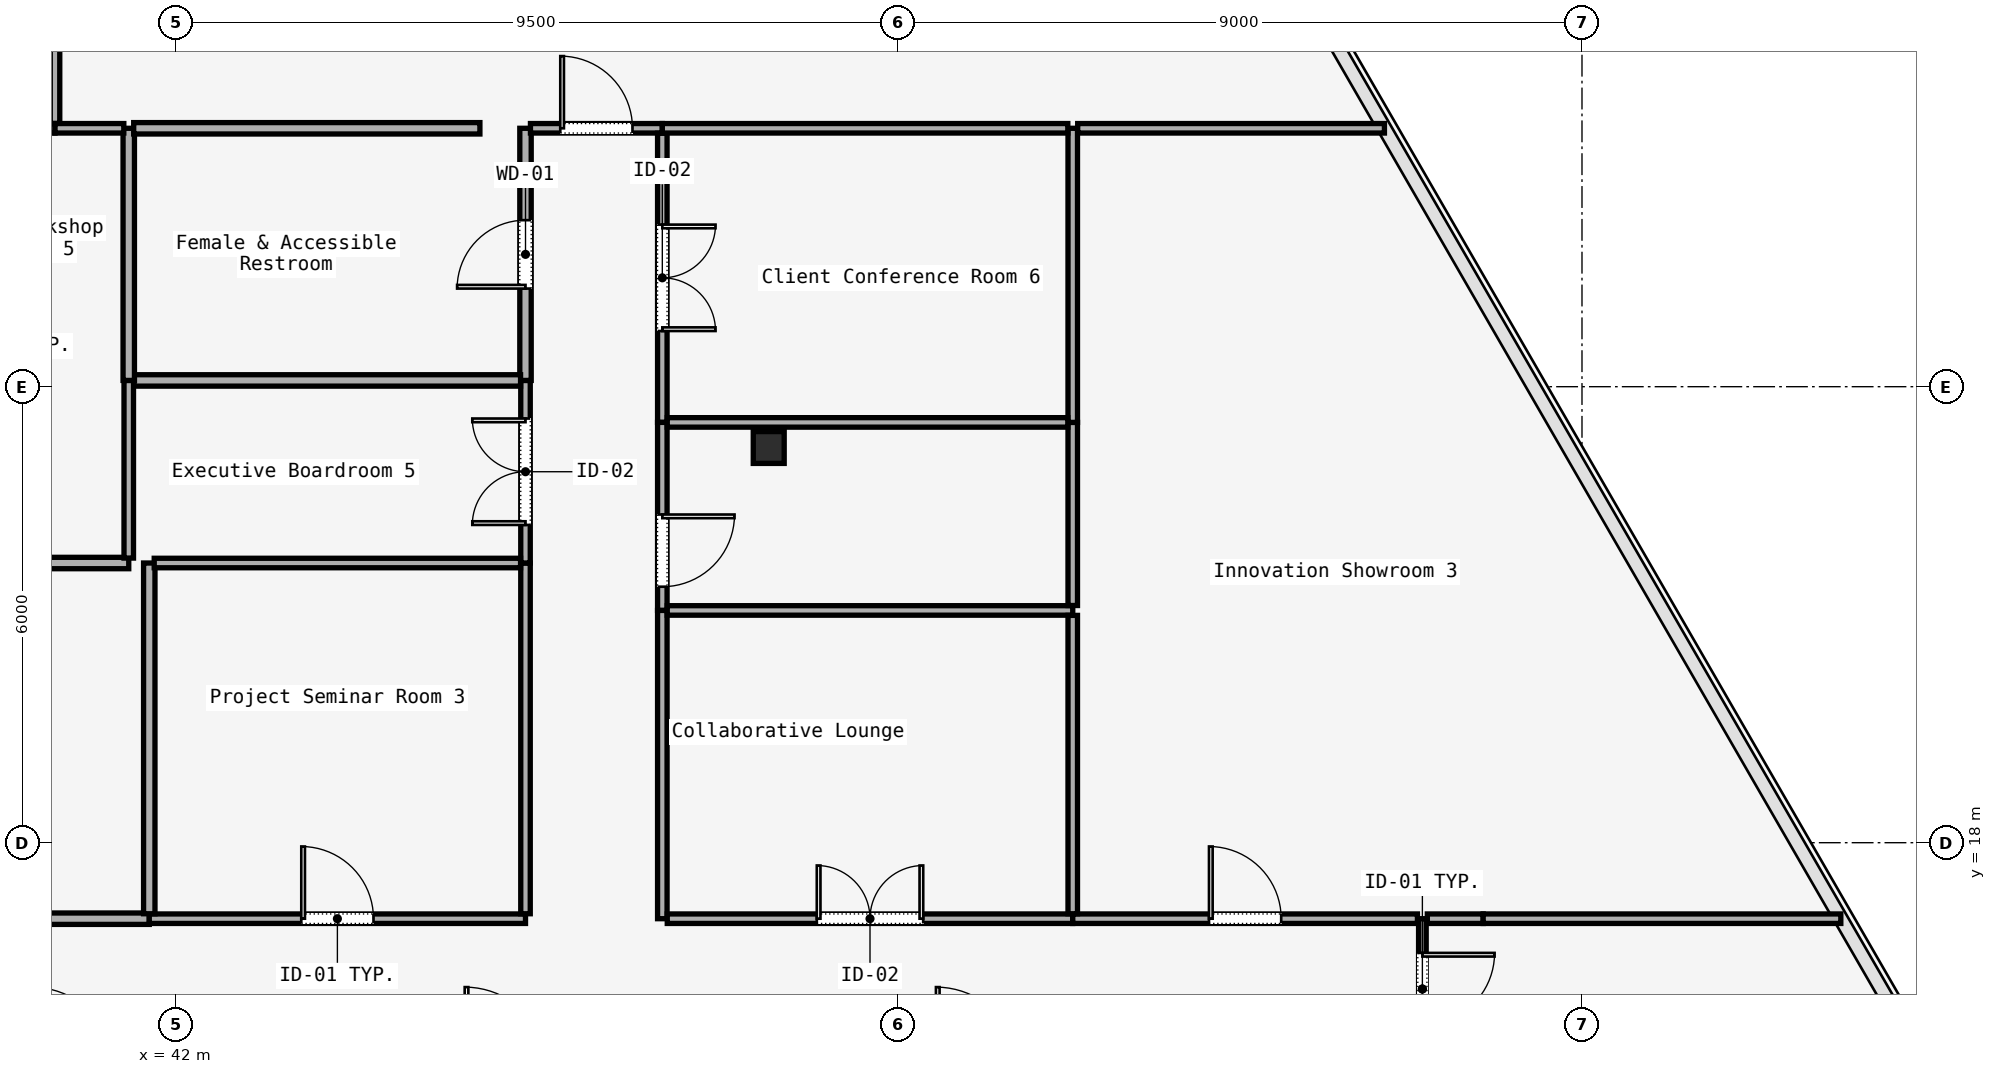
"""IFC4 building model, lengths in metres.
Left out: names, types, materials, properties, quantities, classifications, styles, units other than length and angle.
Written with IfcOpenShell. Run it as: python <this file> out.ifc"""

import sys

from ifc_helpers import new_model, si_unit, direction, frame, frame_2d, origin, origin_2d, place, context, subcontext, project, spatial, rectangle, i_section, extrude, element, fill, save


model = new_model("IFC4")
c1 = context("Model", 3, precision=1e-05, world=origin(), true_north=direction((0.0, 1.0)))
c2 = subcontext(c1, "Body", "Model", "MODEL_VIEW")
j1 = project(units=[si_unit("LENGTHUNIT", "METRE"), si_unit("PLANEANGLEUNIT", "RADIAN")], contexts=[c1])
p1 = place(None, origin())
s1 = spatial("IfcSite", under=j1, at=p1, CompositionType="ELEMENT")
p2 = place(p1, origin())
s2 = spatial("IfcBuilding", under=s1, at=p2, CompositionType="ELEMENT")
p3 = place(p2, frame((0.0, 0.0, 172.6)))
s3 = spatial("IfcBuildingStorey", under=s2, at=p3, CompositionType="ELEMENT", Elevation=172.6)
p4 = place(p3, frame((49.8, 23.2, 0.0), z_axis=(0.0, 0.0, 1.0), x_axis=(1.0, 0.0, 0.0)))
e1 = element("IfcColumn", 1, at=p4, inside=s3, PredefinedType="COLUMN", context=c2, shape_type="SweptSolid", body=[
    extrude(i_section(OverallWidth=0.407, OverallDepth=0.419, WebThickness=0.031, FlangeThickness=0.049, FilletRadius=0.015, at=origin_2d()), origin(), (0.0, 0.0, 1.0), 3.58),
])
p5 = place(p3, frame((58.4, 17.0, 0.0), z_axis=(0.0, 0.0, 1.0), x_axis=(0.0, -1.0, 0.0)))
e2 = element("IfcWall", 2, at=p5, inside=s3, PredefinedType="MOVABLE", context=c2, shape_type="SweptSolid", body=[
    extrude(rectangle(XDim=1.85, YDim=0.1, at=frame_2d((0.925, 0.0))), origin(), (0.0, 0.0, 1.0), 3.01),
])
p6 = place(p5, frame((0.45, 0.0, 0.0)))
e3 = element("IfcOpeningElement", 3, at=p6, cuts=e2, PredefinedType="OPENING", context=c2, shape_type="SweptSolid", body=[
    extrude(rectangle(XDim=0.95, YDim=2.2, at=frame_2d((0.475, 1.1))), frame((0.0, 0.05, 0.0), z_axis=(0.0, -1.0, 0.0), x_axis=(1.0, 0.0, 0.0)), (0.0, 0.0, 1.0), 0.1),
])
p7 = place(p3, frame((37.665, 17.0, 0.0), z_axis=(0.0, 0.0, 1.0), x_axis=(1.0, 0.0, 0.0)))
e4 = element("IfcWall", 4, at=p7, inside=s3, PredefinedType="PARTITIONING", context=c2, shape_type="SweptSolid", body=[
    extrude(rectangle(XDim=3.985, YDim=0.15, at=frame_2d((1.992, 0.0))), origin(), (0.0, 0.0, 1.0), 3.01),
])
p8 = place(p3, frame((41.65, 17.0, 0.0), z_axis=(0.0, 0.0, 1.0), x_axis=(1.0, 0.0, 0.0)))
e5 = element("IfcWall", 5, at=p8, inside=s3, PredefinedType="PARTITIONING", context=c2, shape_type="SweptSolid", body=[
    extrude(rectangle(XDim=4.95, YDim=0.125, at=frame_2d((2.475, 0.0))), origin(), (0.0, 0.0, 1.0), 3.01),
])
p9 = place(p8, frame((2.0, 0.0, 0.0)))
e6 = element("IfcOpeningElement", 6, at=p9, cuts=e5, PredefinedType="OPENING", context=c2, shape_type="SweptSolid", body=[
    extrude(rectangle(XDim=0.95, YDim=2.2, at=frame_2d((0.475, 1.1))), frame((0.0, 0.062, 0.0), z_axis=(0.0, -1.0, 0.0), x_axis=(1.0, 0.0, 0.0)), (0.0, 0.0, 1.0), 0.125),
])
p10 = place(p3, frame((46.6, 17.065, 0.0), z_axis=(0.0, 0.0, 1.0), x_axis=(0.0, 1.0, 0.0)))
e7 = element("IfcWall", 7, at=p10, inside=s3, PredefinedType="PARTITIONING", context=c2, shape_type="SweptSolid", body=[
    extrude(rectangle(XDim=4.615, YDim=0.125, at=frame_2d((2.308, 0.0))), origin(), (0.0, 0.0, 1.0), 3.01),
])
p11 = place(p3, frame((46.6, 21.68, 0.0), z_axis=(0.0, 0.0, 1.0), x_axis=(0.0, 1.0, 0.0)))
e8 = element("IfcWall", 8, at=p11, inside=s3, PredefinedType="PARTITIONING", context=c2, shape_type="SweptSolid", body=[
    extrude(rectangle(XDim=2.403, YDim=0.125, at=frame_2d((1.201, 0.0))), origin(), (0.0, 0.0, 1.0), 3.01),
])
p12 = place(p11, frame((0.501, 0.0, 0.0)))
e9 = element("IfcOpeningElement", 9, at=p12, cuts=e8, PredefinedType="OPENING", context=c2, shape_type="SweptSolid", body=[
    extrude(rectangle(XDim=1.4, YDim=2.2, at=frame_2d((0.7, 1.1))), frame((0.0, 0.062, 0.0), z_axis=(0.0, -1.0, 0.0), x_axis=(1.0, 0.0, 0.0)), (0.0, 0.0, 1.0), 0.125),
])
p13 = place(p3, frame((46.6, 24.083, 0.0), z_axis=(0.0, 0.0, 1.0), x_axis=(0.0, 1.0, 0.0)))
e10 = element("IfcWall", 10, at=p13, inside=s3, PredefinedType="PARTITIONING", context=c2, shape_type="SweptSolid", body=[
    extrude(rectangle(XDim=3.317, YDim=0.15, at=frame_2d((1.659, 0.0))), origin(), (0.0, 0.0, 1.0), 3.01),
])
p14 = place(p13, frame((1.209, 0.0, 0.0)))
e11 = element("IfcOpeningElement", 11, at=p14, cuts=e10, PredefinedType="OPENING", context=c2, shape_type="SweptSolid", body=[
    extrude(rectangle(XDim=0.9, YDim=2.15, at=frame_2d((0.45, 1.075))), frame((0.0, 0.075, 0.0), z_axis=(0.0, -1.0, 0.0), x_axis=(1.0, 0.0, 0.0)), (0.0, 0.0, 1.0), 0.15),
])
p15 = place(p3, frame((46.665, 27.4, 0.0), z_axis=(0.0, 0.0, 1.0), x_axis=(1.0, 0.0, 0.0)))
e12 = element("IfcWall", 12, at=p15, inside=s3, PredefinedType="PARTITIONING", context=c2, shape_type="SweptSolid", body=[
    extrude(rectangle(XDim=1.735, YDim=0.125, at=frame_2d((0.867, 0.0))), origin(), (0.0, 0.0, 1.0), 3.01),
])
p16 = place(p15, frame((0.393, 0.0, 0.0)))
e13 = element("IfcOpeningElement", 13, at=p16, cuts=e12, PredefinedType="OPENING", context=c2, shape_type="SweptSolid", body=[
    extrude(rectangle(XDim=0.95, YDim=2.2, at=frame_2d((0.475, 1.1))), frame((0.0, 0.062, 0.0), z_axis=(0.0, -1.0, 0.0), x_axis=(1.0, 0.0, 0.0)), (0.0, 0.0, 1.0), 0.125),
])
p17 = place(p3, frame((48.4, 27.335, 0.0), z_axis=(0.0, 0.0, 1.0), x_axis=(0.0, -1.0, 0.0)))
e14 = element("IfcWall", 14, at=p17, inside=s3, PredefinedType="PARTITIONING", context=c2, shape_type="SweptSolid", body=[
    extrude(rectangle(XDim=3.805, YDim=0.125, at=frame_2d((1.902, 0.0))), origin(), (0.0, 0.0, 1.0), 3.01),
])
p18 = place(p17, frame((1.202, 0.0, 0.0)))
e15 = element("IfcOpeningElement", 15, at=p18, cuts=e14, PredefinedType="OPENING", context=c2, shape_type="SweptSolid", body=[
    extrude(rectangle(XDim=1.4, YDim=2.2, at=frame_2d((0.7, 1.1))), frame((0.0, 0.062, 0.0), z_axis=(0.0, -1.0, 0.0), x_axis=(1.0, 0.0, 0.0)), (0.0, 0.0, 1.0), 0.125),
])
p19 = place(p3, frame((48.4, 23.53, 0.0), z_axis=(0.0, 0.0, 1.0), x_axis=(0.0, -1.0, 0.0)))
e16 = element("IfcWall", 16, at=p19, inside=s3, PredefinedType="PARTITIONING", context=c2, shape_type="SweptSolid", body=[
    extrude(rectangle(XDim=2.474, YDim=0.125, at=frame_2d((1.237, 0.0))), origin(), (0.0, 0.0, 1.0), 3.01),
])
p20 = place(p19, frame((1.212, 0.0, 0.0)))
e17 = element("IfcOpeningElement", 17, at=p20, cuts=e16, PredefinedType="OPENING", context=c2, shape_type="SweptSolid", body=[
    extrude(rectangle(XDim=0.95, YDim=2.2, at=frame_2d((0.475, 1.1))), frame((0.0, 0.062, 0.0), z_axis=(0.0, -1.0, 0.0), x_axis=(1.0, 0.0, 0.0)), (0.0, 0.0, 1.0), 0.125),
])
p21 = place(p3, frame((48.4, 21.056, 0.0), z_axis=(0.0, 0.0, 1.0), x_axis=(0.0, -1.0, 0.0)))
e18 = element("IfcWall", 18, at=p21, inside=s3, PredefinedType="PARTITIONING", context=c2, shape_type="SweptSolid", body=[
    extrude(rectangle(XDim=4.056, YDim=0.125, at=frame_2d((2.028, 0.0))), origin(), (0.0, 0.0, 1.0), 3.01),
])
p22 = place(p3, frame((48.465, 17.0, 0.0), z_axis=(0.0, 0.0, 1.0), x_axis=(1.0, 0.0, 0.0)))
e19 = element("IfcWall", 19, at=p22, inside=s3, PredefinedType="PARTITIONING", context=c2, shape_type="SweptSolid", body=[
    extrude(rectangle(XDim=5.335, YDim=0.125, at=frame_2d((2.667, 0.0))), origin(), (0.0, 0.0, 1.0), 3.01),
])
p23 = place(p22, frame((1.968, 0.0, 0.0)))
e20 = element("IfcOpeningElement", 20, at=p23, cuts=e19, PredefinedType="OPENING", context=c2, shape_type="SweptSolid", body=[
    extrude(rectangle(XDim=1.4, YDim=2.2, at=frame_2d((0.7, 1.1))), frame((0.0, 0.062, 0.0), z_axis=(0.0, -1.0, 0.0), x_axis=(1.0, 0.0, 0.0)), (0.0, 0.0, 1.0), 0.125),
])
p24 = place(p3, frame((53.8, 17.0, 0.0), z_axis=(0.0, 0.0, 1.0), x_axis=(1.0, 0.0, 0.0)))
e21 = element("IfcWall", 21, at=p24, inside=s3, PredefinedType="PARTITIONING", context=c2, shape_type="SweptSolid", body=[
    extrude(rectangle(XDim=4.535, YDim=0.125, at=frame_2d((2.268, 0.0))), origin(), (0.0, 0.0, 1.0), 3.01),
])
p25 = place(p24, frame((1.792, 0.0, 0.0)))
e22 = element("IfcOpeningElement", 22, at=p25, cuts=e21, PredefinedType="OPENING", context=c2, shape_type="SweptSolid", body=[
    extrude(rectangle(XDim=0.95, YDim=2.2, at=frame_2d((0.475, 1.1))), frame((0.0, 0.062, 0.0), z_axis=(0.0, -1.0, 0.0), x_axis=(1.0, 0.0, 0.0)), (0.0, 0.0, 1.0), 0.125),
])
p26 = place(p3, frame((58.465, 17.0, 0.0), z_axis=(0.0, 0.0, 1.0), x_axis=(1.0, 0.0, 0.0)))
e23 = element("IfcWall", 23, at=p26, inside=s3, PredefinedType="PARTITIONING", context=c2, shape_type="SweptSolid", body=[
    extrude(rectangle(XDim=0.735, YDim=0.125, at=frame_2d((0.367, 0.0))), origin(), (0.0, 0.0, 1.0), 3.01),
])
p27 = place(p3, frame((59.2, 17.0, 0.0), z_axis=(0.0, 0.0, 1.0), x_axis=(1.0, 0.0, 0.0)))
e24 = element("IfcWall", 24, at=p27, inside=s3, PredefinedType="PARTITIONING", context=c2, shape_type="SweptSolid", body=[
    extrude(rectangle(XDim=4.705, YDim=0.125, at=frame_2d((2.353, 0.0))), origin(), (0.0, 0.0, 1.0), 3.01),
])
p28 = place(p3, frame((48.465, 21.056, 0.0), z_axis=(0.0, 0.0, 1.0), x_axis=(1.0, 0.0, 0.0)))
e25 = element("IfcWall", 25, at=p28, inside=s3, PredefinedType="PARTITIONING", context=c2, shape_type="SweptSolid", body=[
    extrude(rectangle(XDim=5.335, YDim=0.125, at=frame_2d((2.667, 0.0))), origin(), (0.0, 0.0, 1.0), 3.01),
])
p29 = place(p3, frame((53.8, 20.991, 0.0), z_axis=(0.0, 0.0, 1.0), x_axis=(0.0, -1.0, 0.0)))
e26 = element("IfcWall", 26, at=p29, inside=s3, PredefinedType="PARTITIONING", context=c2, shape_type="SweptSolid", body=[
    extrude(rectangle(XDim=3.926, YDim=0.125, at=frame_2d((1.963, 0.0))), origin(), (0.0, 0.0, 1.0), 3.01),
])
p30 = place(p3, frame((41.65, 21.68, 0.0), z_axis=(0.0, 0.0, 1.0), x_axis=(0.0, -1.0, 0.0)))
e27 = element("IfcWall", 27, at=p30, inside=s3, PredefinedType="PARTITIONING", context=c2, shape_type="SweptSolid", body=[
    extrude(rectangle(XDim=4.615, YDim=0.15, at=frame_2d((2.308, 0.0))), origin(), (0.0, 0.0, 1.0), 3.01),
])
p31 = place(p3, frame((37.665, 21.68, 0.0), z_axis=(0.0, 0.0, 1.0), x_axis=(1.0, 0.0, 0.0)))
e28 = element("IfcWall", 28, at=p31, inside=s3, PredefinedType="PARTITIONING", context=c2, shape_type="SweptSolid", body=[
    extrude(rectangle(XDim=3.715, YDim=0.15, at=frame_2d((1.857, 0.0))), origin(), (0.0, 0.0, 1.0), 3.01),
])
p32 = place(p3, frame((41.715, 21.68, 0.0), z_axis=(0.0, 0.0, 1.0), x_axis=(1.0, 0.0, 0.0)))
e29 = element("IfcWall", 29, at=p32, inside=s3, PredefinedType="PARTITIONING", context=c2, shape_type="SweptSolid", body=[
    extrude(rectangle(XDim=4.82, YDim=0.125, at=frame_2d((2.41, 0.0))), origin(), (0.0, 0.0, 1.0), 3.01),
])
p33 = place(p3, frame((53.8, 21.121, 0.0), z_axis=(0.0, 0.0, 1.0), x_axis=(0.0, 1.0, 0.0)))
e30 = element("IfcWall", 30, at=p33, inside=s3, PredefinedType="PARTITIONING", context=c2, shape_type="SweptSolid", body=[
    extrude(rectangle(XDim=2.409, YDim=0.125, at=frame_2d((1.205, 0.0))), origin(), (0.0, 0.0, 1.0), 3.01),
])
p34 = place(p3, frame((53.8, 23.53, 0.0), z_axis=(0.0, 0.0, 1.0), x_axis=(0.0, 1.0, 0.0)))
e31 = element("IfcWall", 31, at=p34, inside=s3, PredefinedType="PARTITIONING", context=c2, shape_type="SweptSolid", body=[
    extrude(rectangle(XDim=3.87, YDim=0.125, at=frame_2d((1.935, 0.0))), origin(), (0.0, 0.0, 1.0), 3.01),
])
p35 = place(p3, frame((53.865, 27.4, 0.0), z_axis=(0.0, 0.0, 1.0), x_axis=(1.0, 0.0, 0.0)))
e32 = element("IfcWall", 32, at=p35, inside=s3, PredefinedType="PARTITIONING", context=c2, shape_type="SweptSolid", body=[
    extrude(rectangle(XDim=4.036, YDim=0.125, at=frame_2d((2.018, 0.0))), origin(), (0.0, 0.0, 1.0), 3.01),
])
p36 = place(p3, frame((48.465, 23.53, 0.0), z_axis=(0.0, 0.0, 1.0), x_axis=(1.0, 0.0, 0.0)))
e33 = element("IfcWall", 33, at=p36, inside=s3, PredefinedType="PARTITIONING", context=c2, shape_type="SweptSolid", body=[
    extrude(rectangle(XDim=5.27, YDim=0.125, at=frame_2d((2.635, 0.0))), origin(), (0.0, 0.0, 1.0), 3.01),
])
p37 = place(p3, frame((41.38, 21.745, 0.0), z_axis=(0.0, 0.0, 1.0), x_axis=(0.0, 1.0, 0.0)))
e34 = element("IfcWall", 34, at=p37, inside=s3, PredefinedType="PARTITIONING", context=c2, shape_type="SweptSolid", body=[
    extrude(rectangle(XDim=2.337, YDim=0.125, at=frame_2d((1.169, 0.0))), origin(), (0.0, 0.0, 1.0), 3.01),
])
p38 = place(p3, frame((41.445, 24.083, 0.0), z_axis=(0.0, 0.0, 1.0), x_axis=(1.0, 0.0, 0.0)))
e35 = element("IfcWall", 35, at=p38, inside=s3, PredefinedType="PARTITIONING", context=c2, shape_type="SweptSolid", body=[
    extrude(rectangle(XDim=5.09, YDim=0.15, at=frame_2d((2.545, 0.0))), origin(), (0.0, 0.0, 1.0), 3.01),
])
p39 = place(p3, frame((41.38, 27.4, 0.0), z_axis=(0.0, 0.0, 1.0), x_axis=(0.0, -1.0, 0.0)))
e36 = element("IfcWall", 36, at=p39, inside=s3, PredefinedType="PARTITIONING", context=c2, shape_type="SweptSolid", body=[
    extrude(rectangle(XDim=3.317, YDim=0.15, at=frame_2d((1.659, 0.0))), origin(), (0.0, 0.0, 1.0), 3.01),
])
p40 = place(p3, frame((37.665, 27.4, 0.0), z_axis=(0.0, 0.0, 1.0), x_axis=(1.0, 0.0, 0.0)))
e37 = element("IfcWall", 37, at=p40, inside=s3, PredefinedType="PARTITIONING", context=c2, shape_type="SweptSolid", body=[
    extrude(rectangle(XDim=2.745, YDim=0.125, at=frame_2d((1.373, 0.0))), origin(), (0.0, 0.0, 1.0), 3.01),
])
p41 = place(p3, frame((40.41, 27.4, 0.0), z_axis=(0.0, 0.0, 1.0), x_axis=(1.0, 0.0, 0.0)))
e38 = element("IfcWall", 38, at=p41, inside=s3, PredefinedType="PARTITIONING", context=c2, shape_type="SweptSolid", body=[
    extrude(rectangle(XDim=0.905, YDim=0.125, at=frame_2d((0.453, 0.0))), origin(), (0.0, 0.0, 1.0), 3.01),
])
p42 = place(p3, frame((48.4, 27.4, 0.0), z_axis=(0.0, 0.0, 1.0), x_axis=(1.0, 0.0, 0.0)))
e39 = element("IfcWall", 39, at=p42, inside=s3, PredefinedType="PARTITIONING", context=c2, shape_type="SweptSolid", body=[
    extrude(rectangle(XDim=5.335, YDim=0.125, at=frame_2d((2.667, 0.0))), origin(), (0.0, 0.0, 1.0), 3.01),
])
p43 = place(p3, frame((41.445, 27.4, 0.0), z_axis=(0.0, 0.0, 1.0), x_axis=(1.0, 0.0, 0.0)))
e40 = element("IfcWall", 40, at=p43, inside=s3, PredefinedType="PARTITIONING", context=c2, shape_type="SweptSolid", body=[
    extrude(rectangle(XDim=4.555, YDim=0.15, at=frame_2d((2.277, 0.0))), origin(), (0.0, 0.0, 1.0), 3.01),
])
p44 = place(p3, frame((40.41, 46.248, 0.0), z_axis=(0.0, 0.0, 1.0), x_axis=(0.0, -1.0, 0.0)))
e41 = element("IfcWall", 41, at=p44, inside=s3, PredefinedType="PARTITIONING", context=c2, shape_type="SweptSolid", body=[
    extrude(rectangle(XDim=18.783, YDim=0.125, at=frame_2d((9.392, 0.0))), origin(), (0.0, 0.0, 1.0), 3.01),
])
p45 = place(p44, frame((8.967, 0.0, 0.0)))
e42 = element("IfcOpeningElement", 42, at=p45, cuts=e41, PredefinedType="OPENING", context=c2, shape_type="SweptSolid", body=[
    extrude(rectangle(XDim=0.85, YDim=2.15, at=frame_2d((0.425, 1.075))), frame((0.0, 0.062, 0.0), z_axis=(0.0, -1.0, 0.0), x_axis=(1.0, 0.0, 0.0)), (0.0, 0.0, 1.0), 0.125),
])
p46 = place(p6, origin())
e43 = element("IfcDoor", 43, at=p46, inside=s3, OperationType="SINGLE_SWING_LEFT", PredefinedType="DOOR", context=c2, shape_type="SweptSolid", body=[
    extrude(rectangle(XDim=0.95, YDim=2.2, at=frame_2d((0.475, 1.1))), frame((0.0, 0.025, 0.0), z_axis=(0.0, -1.0, 0.0), x_axis=(1.0, 0.0, 0.0)), (0.0, 0.0, 1.0), 0.05),
])
fill(e3, e43)
p47 = place(p23, origin())
e44 = element("IfcDoor", 44, at=p47, inside=s3, OperationType="SINGLE_SWING_RIGHT", PredefinedType="DOOR", context=c2, shape_type="SweptSolid", body=[
    extrude(rectangle(XDim=1.4, YDim=2.2, at=frame_2d((0.7, 1.1))), frame((0.0, 0.025, 0.0), z_axis=(0.0, -1.0, 0.0), x_axis=(1.0, 0.0, 0.0)), (0.0, 0.0, 1.0), 0.05),
])
fill(e20, e44)
p48 = place(p9, origin())
e45 = element("IfcDoor", 45, at=p48, inside=s3, OperationType="SINGLE_SWING_RIGHT", PredefinedType="DOOR", context=c2, shape_type="SweptSolid", body=[
    extrude(rectangle(XDim=0.95, YDim=2.2, at=frame_2d((0.475, 1.1))), frame((0.0, 0.025, 0.0), z_axis=(0.0, -1.0, 0.0), x_axis=(1.0, 0.0, 0.0)), (0.0, 0.0, 1.0), 0.05),
])
fill(e6, e45)
p49 = place(p25, origin())
e46 = element("IfcDoor", 46, at=p49, inside=s3, OperationType="SINGLE_SWING_RIGHT", PredefinedType="DOOR", context=c2, shape_type="SweptSolid", body=[
    extrude(rectangle(XDim=0.95, YDim=2.2, at=frame_2d((0.475, 1.1))), frame((0.0, 0.025, 0.0), z_axis=(0.0, -1.0, 0.0), x_axis=(1.0, 0.0, 0.0)), (0.0, 0.0, 1.0), 0.05),
])
fill(e22, e46)
p50 = place(p20, origin())
e47 = element("IfcDoor", 47, at=p50, inside=s3, OperationType="SINGLE_SWING_LEFT", PredefinedType="DOOR", context=c2, shape_type="SweptSolid", body=[
    extrude(rectangle(XDim=0.95, YDim=2.2, at=frame_2d((0.475, 1.1))), frame((0.0, 0.025, 0.0), z_axis=(0.0, -1.0, 0.0), x_axis=(1.0, 0.0, 0.0)), (0.0, 0.0, 1.0), 0.05),
])
fill(e17, e47)
p51 = place(p12, origin())
e48 = element("IfcDoor", 48, at=p51, inside=s3, OperationType="SINGLE_SWING_LEFT", PredefinedType="DOOR", context=c2, shape_type="SweptSolid", body=[
    extrude(rectangle(XDim=1.4, YDim=2.2, at=frame_2d((0.7, 1.1))), frame((0.0, 0.025, 0.0), z_axis=(0.0, -1.0, 0.0), x_axis=(1.0, 0.0, 0.0)), (0.0, 0.0, 1.0), 0.05),
])
fill(e9, e48)
p52 = place(p18, origin())
e49 = element("IfcDoor", 49, at=p52, inside=s3, OperationType="SINGLE_SWING_LEFT", PredefinedType="DOOR", context=c2, shape_type="SweptSolid", body=[
    extrude(rectangle(XDim=1.4, YDim=2.2, at=frame_2d((0.7, 1.1))), frame((0.0, 0.025, 0.0), z_axis=(0.0, -1.0, 0.0), x_axis=(1.0, 0.0, 0.0)), (0.0, 0.0, 1.0), 0.05),
])
fill(e15, e49)
p53 = place(p14, origin())
e50 = element("IfcDoor", 50, at=p53, inside=s3, OperationType="SINGLE_SWING_LEFT", PredefinedType="DOOR", context=c2, shape_type="SweptSolid", body=[
    extrude(rectangle(XDim=0.9, YDim=2.15, at=frame_2d((0.45, 1.075))), frame((0.0, 0.025, 0.0), z_axis=(0.0, -1.0, 0.0), x_axis=(1.0, 0.0, 0.0)), (0.0, 0.0, 1.0), 0.05),
])
fill(e11, e50)
p54 = place(p16, origin())
e51 = element("IfcDoor", 51, at=p54, inside=s3, OperationType="SINGLE_SWING_LEFT", PredefinedType="DOOR", context=c2, shape_type="SweptSolid", body=[
    extrude(rectangle(XDim=0.95, YDim=2.2, at=frame_2d((0.475, 1.1))), frame((0.0, 0.025, 0.0), z_axis=(0.0, -1.0, 0.0), x_axis=(1.0, 0.0, 0.0)), (0.0, 0.0, 1.0), 0.05),
])
fill(e13, e51)
save(model, sys.argv[1])
